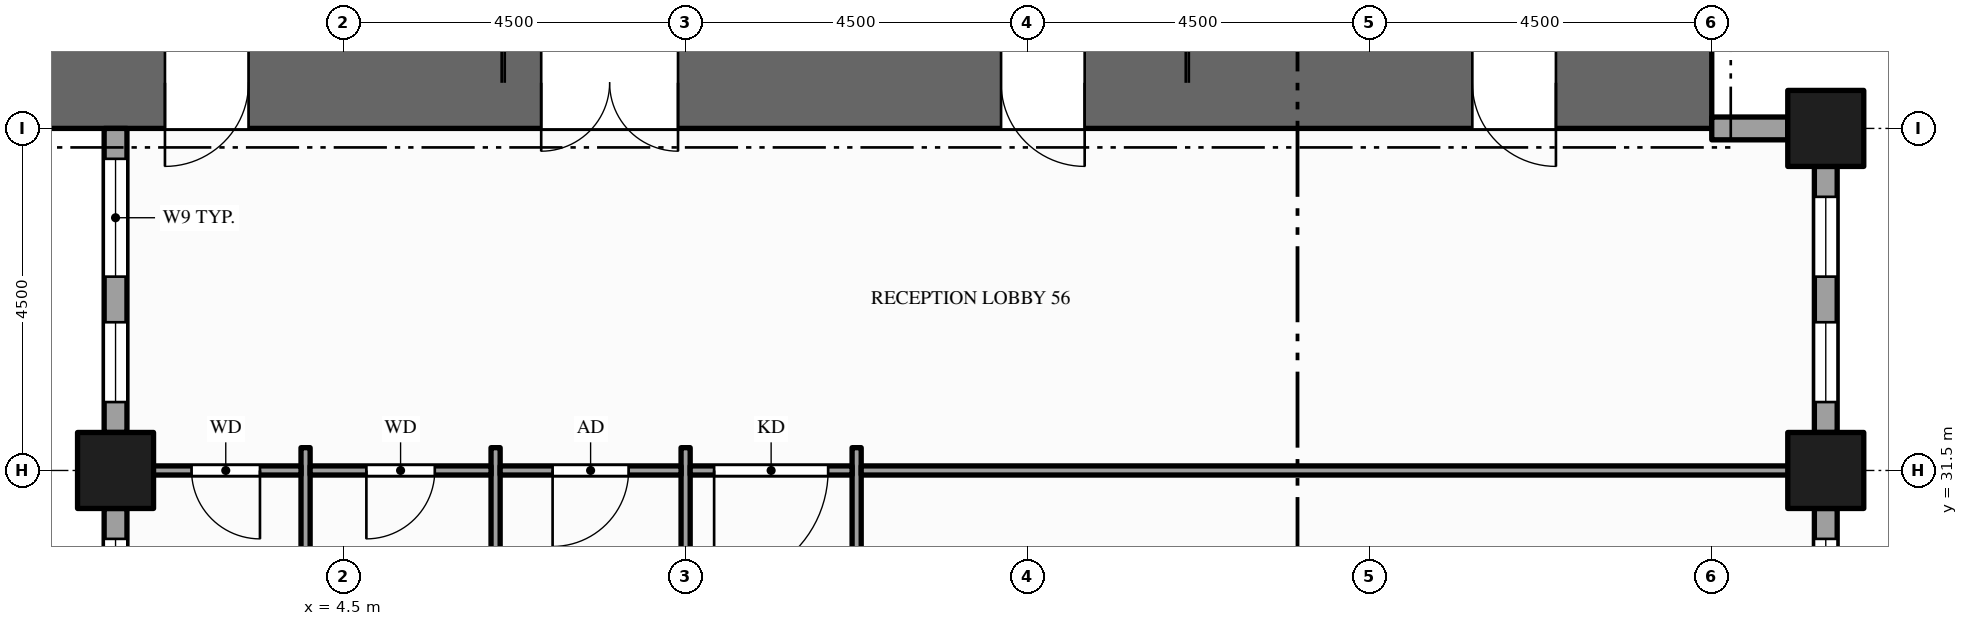
"""IFC4 building model, lengths in metres.
Left out: names, types, materials, properties, quantities, classifications, styles, units other than length and angle.
Written with IfcOpenShell. Run it as: python <this file> out.ifc"""

import sys

from ifc_helpers import new_model, si_unit, direction, frame, frame_2d, origin, origin_2d, place, context, subcontext, project, spatial, rectangle, hollow_rectangle, extrude, element, fill, save


model = new_model("IFC4")
c1 = context("Model", 3, precision=1e-05, world=origin(), true_north=direction((0.0, 1.0)))
c2 = subcontext(c1, "Body", "Model", "MODEL_VIEW")
j1 = project(units=[si_unit("LENGTHUNIT", "METRE"), si_unit("PLANEANGLEUNIT", "RADIAN")], contexts=[c1])
p1 = place(None, origin())
s1 = spatial("IfcSite", under=j1, at=p1, CompositionType="ELEMENT")
p2 = place(p1, origin())
s2 = spatial("IfcBuilding", under=s1, at=p2, CompositionType="ELEMENT")
p3 = place(p2, frame((0.0, 0.0, 103.0)))
s3 = spatial("IfcBuildingStorey", under=s2, at=p3, CompositionType="ELEMENT", Elevation=103.0)
p4 = place(p3, frame((0.0, 36.6, -0.15), z_axis=(0.0, 0.0, 1.0), x_axis=(1.0, 0.0, 0.0)))
e1 = element("IfcWall", 1, at=p4, inside=s3, PredefinedType="SHEAR", context=c2, shape_type="SweptSolid", body=[
    extrude(rectangle(XDim=22.5, YDim=1.2, at=frame_2d((11.25, 0.0))), origin(), (0.0, 0.0, 1.0), 4.0),
])
p5 = place(p4, frame((7.1, 0.0, 0.15)))
e2 = element("IfcOpeningElement", 2, at=p5, cuts=e1, PredefinedType="OPENING", context=c2, shape_type="SweptSolid", body=[
    extrude(rectangle(XDim=1.8, YDim=2.1, at=frame_2d((0.9, 1.05))), frame((0.0, 0.61, 0.0), z_axis=(0.0, -1.0, 0.0), x_axis=(1.0, 0.0, 0.0)), (0.0, 0.0, 1.0), 1.22),
])
p6 = place(p4, frame((13.15, 0.0, 0.15)))
e3 = element("IfcOpeningElement", 3, at=p6, cuts=e1, PredefinedType="OPENING", context=c2, shape_type="SweptSolid", body=[
    extrude(rectangle(XDim=1.1, YDim=2.1, at=frame_2d((0.55, 1.05))), frame((0.0, 0.61, 0.0), z_axis=(0.0, -1.0, 0.0), x_axis=(1.0, 0.0, 0.0)), (0.0, 0.0, 1.0), 1.22),
])
p7 = place(p4, frame((2.15, 0.0, 0.15)))
e4 = element("IfcOpeningElement", 4, at=p7, cuts=e1, PredefinedType="OPENING", context=c2, shape_type="SweptSolid", body=[
    extrude(rectangle(XDim=1.1, YDim=2.1, at=frame_2d((0.55, 1.05))), frame((0.0, 0.61, 0.0), z_axis=(0.0, -1.0, 0.0), x_axis=(1.0, 0.0, 0.0)), (0.0, 0.0, 1.0), 1.22),
])
p8 = place(p4, frame((19.35, 0.0, 0.15)))
e5 = element("IfcOpeningElement", 5, at=p8, cuts=e1, PredefinedType="OPENING", context=c2, shape_type="SweptSolid", body=[
    extrude(rectangle(XDim=1.1, YDim=2.1, at=frame_2d((0.55, 1.05))), frame((0.0, 0.61, 0.0), z_axis=(0.0, -1.0, 0.0), x_axis=(1.0, 0.0, 0.0)), (0.0, 0.0, 1.0), 1.22),
])
for number, where, z_axis, x_axis in (
    (6, (1.5, 31.5, -0.15), (0.0, 0.0, 1.0), (1.0, 0.0, 0.0)),
    (7, (24.0, 31.5, -0.15), (0.0, 0.0, 1.0), (1.0, 0.0, 0.0)),
    (8, (24.0, 36.0, -0.15), (0.0, 0.0, 1.0), (1.0, 0.0, 0.0)),
):
    element("IfcColumn", number, at=place(p3, frame(where, z_axis=z_axis, x_axis=x_axis)), inside=s3, PredefinedType="COLUMN", context=c2, shape_type="SweptSolid", body=[
        extrude(hollow_rectangle(XDim=1.0, YDim=1.0, WallThickness=0.05, at=origin_2d()), origin(), (0.0, 0.0, 1.0), 4.0),
    ])
p9 = place(p3, frame((24.0, 26.0, 0.0), z_axis=(0.0, 0.0, 1.0), x_axis=(0.0, 1.0, 0.0)))
e9 = element("IfcWall", 9, at=p9, inside=s3, PredefinedType="STANDARD", context=c2, shape_type="SweptSolid", body=[
    extrude(rectangle(XDim=5.0, YDim=0.3, at=frame_2d((2.5, 0.0))), origin(), (0.0, 0.0, 1.0), 3.154),
])
p10 = place(p9, frame((1.3, 0.0, 0.9)))
e10 = element("IfcOpeningElement", 10, at=p10, cuts=e9, PredefinedType="OPENING", context=c2, shape_type="SweptSolid", body=[
    extrude(rectangle(XDim=1.65, YDim=2.0, at=frame_2d((0.825, 1.0))), frame((0.0, 0.16, 0.0), z_axis=(0.0, -1.0, 0.0), x_axis=(1.0, 0.0, 0.0)), (0.0, 0.0, 1.0), 0.32),
])
p11 = place(p9, frame((3.55, 0.0, 0.9)))
e11 = element("IfcOpeningElement", 11, at=p11, cuts=e9, PredefinedType="OPENING", context=c2, shape_type="SweptSolid", body=[
    extrude(rectangle(XDim=1.05, YDim=2.0, at=frame_2d((0.525, 1.0))), frame((0.0, 0.16, 0.0), z_axis=(0.0, -1.0, 0.0), x_axis=(1.0, 0.0, 0.0)), (0.0, 0.0, 1.0), 0.32),
])
p12 = place(p3, frame((24.0, 32.0, 0.0), z_axis=(0.0, 0.0, 1.0), x_axis=(0.0, 1.0, 0.0)))
e12 = element("IfcWall", 12, at=p12, inside=s3, PredefinedType="STANDARD", context=c2, shape_type="SweptSolid", body=[
    extrude(rectangle(XDim=3.5, YDim=0.3, at=frame_2d((1.75, 0.0))), origin(), (0.0, 0.0, 1.0), 3.154),
])
p13 = place(p12, frame((0.4, 0.0, 0.9)))
e13 = element("IfcOpeningElement", 13, at=p13, cuts=e12, PredefinedType="OPENING", context=c2, shape_type="SweptSolid", body=[
    extrude(rectangle(XDim=1.05, YDim=2.0, at=frame_2d((0.525, 1.0))), frame((0.0, 0.16, 0.0), z_axis=(0.0, -1.0, 0.0), x_axis=(1.0, 0.0, 0.0)), (0.0, 0.0, 1.0), 0.32),
])
p14 = place(p12, frame((2.05, 0.0, 0.9)))
e14 = element("IfcOpeningElement", 14, at=p14, cuts=e12, PredefinedType="OPENING", context=c2, shape_type="SweptSolid", body=[
    extrude(rectangle(XDim=1.05, YDim=2.0, at=frame_2d((0.525, 1.0))), frame((0.0, 0.16, 0.0), z_axis=(0.0, -1.0, 0.0), x_axis=(1.0, 0.0, 0.0)), (0.0, 0.0, 1.0), 0.32),
])
p15 = place(p3, frame((23.5, 36.0, 0.0), z_axis=(0.0, 0.0, 1.0), x_axis=(-1.0, 0.0, 0.0)))
e15 = element("IfcWall", 15, at=p15, inside=s3, PredefinedType="STANDARD", context=c2, shape_type="SweptSolid", body=[
    extrude(rectangle(XDim=1.0, YDim=0.3, at=frame_2d((0.5, 0.0))), origin(), (0.0, 0.0, 1.0), 2.938),
])
p16 = place(p3, frame((1.5, 36.0, 0.0), z_axis=(0.0, 0.0, 1.0), x_axis=(0.0, -1.0, 0.0)))
e16 = element("IfcWall", 16, at=p16, inside=s3, PredefinedType="STANDARD", context=c2, shape_type="SweptSolid", body=[
    extrude(rectangle(XDim=4.0, YDim=0.3, at=frame_2d((2.0, 0.0))), origin(), (0.0, 0.0, 1.0), 3.154),
])
p17 = place(p16, frame((0.4, 0.0, 0.9)))
e17 = element("IfcOpeningElement", 17, at=p17, cuts=e16, PredefinedType="OPENING", context=c2, shape_type="SweptSolid", body=[
    extrude(rectangle(XDim=1.55, YDim=2.0, at=frame_2d((0.775, 1.0))), frame((0.0, 0.16, 0.0), z_axis=(0.0, -1.0, 0.0), x_axis=(1.0, 0.0, 0.0)), (0.0, 0.0, 1.0), 0.32),
])
p18 = place(p16, frame((2.55, 0.0, 0.9)))
e18 = element("IfcOpeningElement", 18, at=p18, cuts=e16, PredefinedType="OPENING", context=c2, shape_type="SweptSolid", body=[
    extrude(rectangle(XDim=1.05, YDim=2.0, at=frame_2d((0.525, 1.0))), frame((0.0, 0.16, 0.0), z_axis=(0.0, -1.0, 0.0), x_axis=(1.0, 0.0, 0.0)), (0.0, 0.0, 1.0), 0.32),
])
p19 = place(p3, frame((1.5, 31.0, 0.0), z_axis=(0.0, 0.0, 1.0), x_axis=(0.0, -1.0, 0.0)))
e19 = element("IfcWall", 19, at=p19, inside=s3, PredefinedType="STANDARD", context=c2, shape_type="SweptSolid", body=[
    extrude(rectangle(XDim=3.5, YDim=0.3, at=frame_2d((1.75, 0.0))), origin(), (0.0, 0.0, 1.0), 3.154),
])
p20 = place(p19, frame((0.4, 0.0, 0.9)))
e20 = element("IfcOpeningElement", 20, at=p20, cuts=e19, PredefinedType="OPENING", context=c2, shape_type="SweptSolid", body=[
    extrude(rectangle(XDim=1.05, YDim=2.0, at=frame_2d((0.525, 1.0))), frame((0.0, 0.16, 0.0), z_axis=(0.0, -1.0, 0.0), x_axis=(1.0, 0.0, 0.0)), (0.0, 0.0, 1.0), 0.32),
])
p21 = place(p19, frame((2.05, 0.0, 0.9)))
e21 = element("IfcOpeningElement", 21, at=p21, cuts=e19, PredefinedType="OPENING", context=c2, shape_type="SweptSolid", body=[
    extrude(rectangle(XDim=1.05, YDim=2.0, at=frame_2d((0.525, 1.0))), frame((0.0, 0.16, 0.0), z_axis=(0.0, -1.0, 0.0), x_axis=(1.0, 0.0, 0.0)), (0.0, 0.0, 1.0), 0.32),
])
for number, where, z_axis, x_axis in (
    (22, (4.0, 26.7, 0.0), (0.0, 0.0, 1.0), (0.0, 1.0, 0.0)),
    (23, (6.5, 26.7, 0.0), (0.0, 0.0, 1.0), (0.0, 1.0, 0.0)),
):
    element("IfcWall", number, at=place(p3, frame(where, z_axis=z_axis, x_axis=x_axis)), inside=s3, PredefinedType="PARTITIONING", context=c2, shape_type="SweptSolid", body=[
        extrude(rectangle(XDim=5.1, YDim=0.12, at=frame_2d((2.55, 0.0))), origin(), (0.0, 0.0, 1.0), 3.85),
    ])
p22 = place(p3, frame((9.0, 8.7, 0.0), z_axis=(0.0, 0.0, 1.0), x_axis=(0.0, 1.0, 0.0)))
e24 = element("IfcWall", 24, at=p22, inside=s3, PredefinedType="PARTITIONING", context=c2, shape_type="SweptSolid", body=[
    extrude(rectangle(XDim=23.1, YDim=0.12, at=frame_2d((11.55, 0.0))), origin(), (0.0, 0.0, 1.0), 2.6),
])
p23 = place(p22, frame((2.05, 0.0, 0.0)))
e25 = element("IfcOpeningElement", 25, at=p23, cuts=e24, PredefinedType="OPENING", context=c2, shape_type="SweptSolid", body=[
    extrude(rectangle(XDim=1.0, YDim=2.1, at=frame_2d((0.5, 1.05))), frame((0.0, 0.07, 0.0), z_axis=(0.0, -1.0, 0.0), x_axis=(1.0, 0.0, 0.0)), (0.0, 0.0, 1.0), 0.14),
])
p24 = place(p22, frame((7.675, 0.0, 0.0)))
e26 = element("IfcOpeningElement", 26, at=p24, cuts=e24, PredefinedType="OPENING", context=c2, shape_type="SweptSolid", body=[
    extrude(rectangle(XDim=1.0, YDim=2.1, at=frame_2d((0.5, 1.05))), frame((0.0, 0.07, 0.0), z_axis=(0.0, -1.0, 0.0), x_axis=(1.0, 0.0, 0.0)), (0.0, 0.0, 1.0), 0.14),
])
p25 = place(p22, frame((14.355, 0.0, 0.0)))
e27 = element("IfcOpeningElement", 27, at=p25, cuts=e24, PredefinedType="OPENING", context=c2, shape_type="SweptSolid", body=[
    extrude(rectangle(XDim=1.2, YDim=2.1, at=frame_2d((0.6, 1.05))), frame((0.0, 0.07, 0.0), z_axis=(0.0, -1.0, 0.0), x_axis=(1.0, 0.0, 0.0)), (0.0, 0.0, 1.0), 0.14),
])
p26 = place(p3, frame((11.25, 8.7, 0.0), z_axis=(0.0, 0.0, 1.0), x_axis=(0.0, 1.0, 0.0)))
e28 = element("IfcWall", 28, at=p26, inside=s3, PredefinedType="PARTITIONING", context=c2, shape_type="SweptSolid", body=[
    extrude(rectangle(XDim=23.1, YDim=0.12, at=frame_2d((11.55, 0.0))), origin(), (0.0, 0.0, 1.0), 2.6),
])
p27 = place(p26, frame((18.925, 0.0, 0.0)))
e29 = element("IfcOpeningElement", 29, at=p27, cuts=e28, PredefinedType="OPENING", context=c2, shape_type="SweptSolid", body=[
    extrude(rectangle(XDim=1.0, YDim=2.1, at=frame_2d((0.5, 1.05))), frame((0.0, 0.07, 0.0), z_axis=(0.0, -1.0, 0.0), x_axis=(1.0, 0.0, 0.0)), (0.0, 0.0, 1.0), 0.14),
])
p28 = place(p26, frame((4.2, 0.0, 0.0)))
e30 = element("IfcOpeningElement", 30, at=p28, cuts=e28, PredefinedType="OPENING", context=c2, shape_type="SweptSolid", body=[
    extrude(rectangle(XDim=1.2, YDim=2.1, at=frame_2d((0.6, 1.05))), frame((0.0, 0.07, 0.0), z_axis=(0.0, -1.0, 0.0), x_axis=(1.0, 0.0, 0.0)), (0.0, 0.0, 1.0), 0.14),
])
p29 = place(p3, frame((1.65, 31.5, 0.0), z_axis=(0.0, 0.0, 1.0), x_axis=(1.0, 0.0, 0.0)))
e31 = element("IfcWall", 31, at=p29, inside=s3, PredefinedType="PARTITIONING", context=c2, shape_type="SweptSolid", body=[
    extrude(rectangle(XDim=2.29, YDim=0.12, at=frame_2d((1.145, 0.0))), origin(), (0.0, 0.0, 1.0), 2.938),
])
p30 = place(p29, frame((0.85, 0.0, 0.0)))
e32 = element("IfcOpeningElement", 32, at=p30, cuts=e31, PredefinedType="OPENING", context=c2, shape_type="SweptSolid", body=[
    extrude(rectangle(XDim=0.9, YDim=2.1, at=frame_2d((0.45, 1.05))), frame((0.0, 0.07, 0.0), z_axis=(0.0, -1.0, 0.0), x_axis=(1.0, 0.0, 0.0)), (0.0, 0.0, 1.0), 0.14),
])
p31 = place(p3, frame((4.06, 31.5, 0.0), z_axis=(0.0, 0.0, 1.0), x_axis=(1.0, 0.0, 0.0)))
e33 = element("IfcWall", 33, at=p31, inside=s3, PredefinedType="PARTITIONING", context=c2, shape_type="SweptSolid", body=[
    extrude(rectangle(XDim=2.38, YDim=0.12, at=frame_2d((1.19, 0.0))), origin(), (0.0, 0.0, 1.0), 2.938),
])
p32 = place(p31, frame((0.74, 0.0, 0.0)))
e34 = element("IfcOpeningElement", 34, at=p32, cuts=e33, PredefinedType="OPENING", context=c2, shape_type="SweptSolid", body=[
    extrude(rectangle(XDim=0.9, YDim=2.1, at=frame_2d((0.45, 1.05))), frame((0.0, 0.07, 0.0), z_axis=(0.0, -1.0, 0.0), x_axis=(1.0, 0.0, 0.0)), (0.0, 0.0, 1.0), 0.14),
])
p33 = place(p3, frame((6.56, 31.5, 0.0), z_axis=(0.0, 0.0, 1.0), x_axis=(1.0, 0.0, 0.0)))
e35 = element("IfcWall", 35, at=p33, inside=s3, PredefinedType="PARTITIONING", context=c2, shape_type="SweptSolid", body=[
    extrude(rectangle(XDim=2.38, YDim=0.12, at=frame_2d((1.19, 0.0))), origin(), (0.0, 0.0, 1.0), 2.938),
])
p34 = place(p33, frame((0.69, 0.0, 0.0)))
e36 = element("IfcOpeningElement", 36, at=p34, cuts=e35, PredefinedType="OPENING", context=c2, shape_type="SweptSolid", body=[
    extrude(rectangle(XDim=1.0, YDim=2.1, at=frame_2d((0.5, 1.05))), frame((0.0, 0.07, 0.0), z_axis=(0.0, -1.0, 0.0), x_axis=(1.0, 0.0, 0.0)), (0.0, 0.0, 1.0), 0.14),
])
p35 = place(p3, frame((9.06, 31.5, 0.0), z_axis=(0.0, 0.0, 1.0), x_axis=(1.0, 0.0, 0.0)))
e37 = element("IfcWall", 37, at=p35, inside=s3, PredefinedType="PARTITIONING", context=c2, shape_type="SweptSolid", body=[
    extrude(rectangle(XDim=2.13, YDim=0.12, at=frame_2d((1.065, 0.0))), origin(), (0.0, 0.0, 1.0), 2.938),
])
p36 = place(p35, frame((0.315, 0.0, 0.0)))
e38 = element("IfcOpeningElement", 38, at=p36, cuts=e37, PredefinedType="OPENING", context=c2, shape_type="SweptSolid", body=[
    extrude(rectangle(XDim=1.5, YDim=2.1, at=frame_2d((0.75, 1.05))), frame((0.0, 0.07, 0.0), z_axis=(0.0, -1.0, 0.0), x_axis=(1.0, 0.0, 0.0)), (0.0, 0.0, 1.0), 0.14),
])
p37 = place(p3, frame((11.31, 31.5, 0.0), z_axis=(0.0, 0.0, 1.0), x_axis=(1.0, 0.0, 0.0)))
e39 = element("IfcWall", 39, at=p37, inside=s3, PredefinedType="PARTITIONING", context=c2, shape_type="SweptSolid", body=[
    extrude(rectangle(XDim=12.54, YDim=0.12, at=frame_2d((6.27, 0.0))), origin(), (0.0, 0.0, 1.0), 2.938),
])
p38 = place(p11, origin())
e40 = element("IfcWindow", 40, at=p38, inside=s3, PartitioningType="SINGLE_PANEL", PredefinedType="WINDOW", context=c2, shape_type="SweptSolid", body=[
    extrude(rectangle(XDim=1.05, YDim=2.0, at=frame_2d((0.525, 1.0))), frame((0.0, 0.03, 0.0), z_axis=(0.0, -1.0, 0.0), x_axis=(1.0, 0.0, 0.0)), (0.0, 0.0, 1.0), 0.06),
])
fill(e11, e40)
p39 = place(p13, origin())
e41 = element("IfcWindow", 41, at=p39, inside=s3, PartitioningType="SINGLE_PANEL", PredefinedType="WINDOW", context=c2, shape_type="SweptSolid", body=[
    extrude(rectangle(XDim=1.05, YDim=2.0, at=frame_2d((0.525, 1.0))), frame((0.0, 0.03, 0.0), z_axis=(0.0, -1.0, 0.0), x_axis=(1.0, 0.0, 0.0)), (0.0, 0.0, 1.0), 0.06),
])
fill(e13, e41)
p40 = place(p14, origin())
e42 = element("IfcWindow", 42, at=p40, inside=s3, PartitioningType="SINGLE_PANEL", PredefinedType="WINDOW", context=c2, shape_type="SweptSolid", body=[
    extrude(rectangle(XDim=1.05, YDim=2.0, at=frame_2d((0.525, 1.0))), frame((0.0, 0.03, 0.0), z_axis=(0.0, -1.0, 0.0), x_axis=(1.0, 0.0, 0.0)), (0.0, 0.0, 1.0), 0.06),
])
fill(e14, e42)
p41 = place(p17, origin())
e43 = element("IfcWindow", 43, at=p41, inside=s3, PartitioningType="SINGLE_PANEL", PredefinedType="WINDOW", context=c2, shape_type="SweptSolid", body=[
    extrude(rectangle(XDim=1.55, YDim=2.0, at=frame_2d((0.775, 1.0))), frame((0.0, 0.03, 0.0), z_axis=(0.0, -1.0, 0.0), x_axis=(1.0, 0.0, 0.0)), (0.0, 0.0, 1.0), 0.06),
])
fill(e17, e43)
p42 = place(p18, origin())
e44 = element("IfcWindow", 44, at=p42, inside=s3, PartitioningType="SINGLE_PANEL", PredefinedType="WINDOW", context=c2, shape_type="SweptSolid", body=[
    extrude(rectangle(XDim=1.05, YDim=2.0, at=frame_2d((0.525, 1.0))), frame((0.0, 0.03, 0.0), z_axis=(0.0, -1.0, 0.0), x_axis=(1.0, 0.0, 0.0)), (0.0, 0.0, 1.0), 0.06),
])
fill(e18, e44)
p43 = place(p20, origin())
e45 = element("IfcWindow", 45, at=p43, inside=s3, PartitioningType="SINGLE_PANEL", PredefinedType="WINDOW", context=c2, shape_type="SweptSolid", body=[
    extrude(rectangle(XDim=1.05, YDim=2.0, at=frame_2d((0.525, 1.0))), frame((0.0, 0.03, 0.0), z_axis=(0.0, -1.0, 0.0), x_axis=(1.0, 0.0, 0.0)), (0.0, 0.0, 1.0), 0.06),
])
fill(e20, e45)
p44 = place(p5, origin())
e46 = element("IfcDoor", 46, at=p44, inside=s3, OperationType="DOUBLE_DOOR_SINGLE_SWING", PredefinedType="DOOR", context=c2, shape_type="SweptSolid", body=[
    extrude(rectangle(XDim=1.8, YDim=2.1, at=frame_2d((0.9, 1.05))), frame((0.0, 0.025, 0.0), z_axis=(0.0, -1.0, 0.0), x_axis=(1.0, 0.0, 0.0)), (0.0, 0.0, 1.0), 0.05),
])
fill(e2, e46)
p45 = place(p6, origin())
e47 = element("IfcDoor", 47, at=p45, inside=s3, OperationType="SINGLE_SWING_RIGHT", PredefinedType="DOOR", context=c2, shape_type="SweptSolid", body=[
    extrude(rectangle(XDim=1.1, YDim=2.1, at=frame_2d((0.55, 1.05))), frame((0.0, 0.025, 0.0), z_axis=(0.0, -1.0, 0.0), x_axis=(1.0, 0.0, 0.0)), (0.0, 0.0, 1.0), 0.05),
])
fill(e3, e47)
p46 = place(p7, origin())
e48 = element("IfcDoor", 48, at=p46, inside=s3, OperationType="SINGLE_SWING_LEFT", PredefinedType="DOOR", context=c2, shape_type="SweptSolid", body=[
    extrude(rectangle(XDim=1.1, YDim=2.1, at=frame_2d((0.55, 1.05))), frame((0.0, 0.025, 0.0), z_axis=(0.0, -1.0, 0.0), x_axis=(1.0, 0.0, 0.0)), (0.0, 0.0, 1.0), 0.05),
])
fill(e4, e48)
p47 = place(p8, origin())
e49 = element("IfcDoor", 49, at=p47, inside=s3, OperationType="SINGLE_SWING_RIGHT", PredefinedType="DOOR", context=c2, shape_type="SweptSolid", body=[
    extrude(rectangle(XDim=1.1, YDim=2.1, at=frame_2d((0.55, 1.05))), frame((0.0, 0.025, 0.0), z_axis=(0.0, -1.0, 0.0), x_axis=(1.0, 0.0, 0.0)), (0.0, 0.0, 1.0), 0.05),
])
fill(e5, e49)
p48 = place(p36, origin())
e50 = element("IfcDoor", 50, at=p48, inside=s3, OperationType="SINGLE_SWING_LEFT", PredefinedType="DOOR", context=c2, shape_type="SweptSolid", body=[
    extrude(rectangle(XDim=1.5, YDim=2.1, at=frame_2d((0.75, 1.05))), frame((0.0, 0.025, 0.0), z_axis=(0.0, -1.0, 0.0), x_axis=(1.0, 0.0, 0.0)), (0.0, 0.0, 1.0), 0.05),
])
fill(e38, e50)
p49 = place(p30, origin())
e51 = element("IfcDoor", 51, at=p49, inside=s3, OperationType="SINGLE_SWING_RIGHT", PredefinedType="DOOR", context=c2, shape_type="SweptSolid", body=[
    extrude(rectangle(XDim=0.9, YDim=2.1, at=frame_2d((0.45, 1.05))), frame((0.0, 0.025, 0.0), z_axis=(0.0, -1.0, 0.0), x_axis=(1.0, 0.0, 0.0)), (0.0, 0.0, 1.0), 0.05),
])
fill(e32, e51)
p50 = place(p32, origin())
e52 = element("IfcDoor", 52, at=p50, inside=s3, OperationType="SINGLE_SWING_LEFT", PredefinedType="DOOR", context=c2, shape_type="SweptSolid", body=[
    extrude(rectangle(XDim=0.9, YDim=2.1, at=frame_2d((0.45, 1.05))), frame((0.0, 0.025, 0.0), z_axis=(0.0, -1.0, 0.0), x_axis=(1.0, 0.0, 0.0)), (0.0, 0.0, 1.0), 0.05),
])
fill(e34, e52)
p51 = place(p34, origin())
e53 = element("IfcDoor", 53, at=p51, inside=s3, OperationType="SINGLE_SWING_LEFT", PredefinedType="DOOR", context=c2, shape_type="SweptSolid", body=[
    extrude(rectangle(XDim=1.0, YDim=2.1, at=frame_2d((0.5, 1.05))), frame((0.0, 0.025, 0.0), z_axis=(0.0, -1.0, 0.0), x_axis=(1.0, 0.0, 0.0)), (0.0, 0.0, 1.0), 0.05),
])
fill(e36, e53)
save(model, sys.argv[1])
